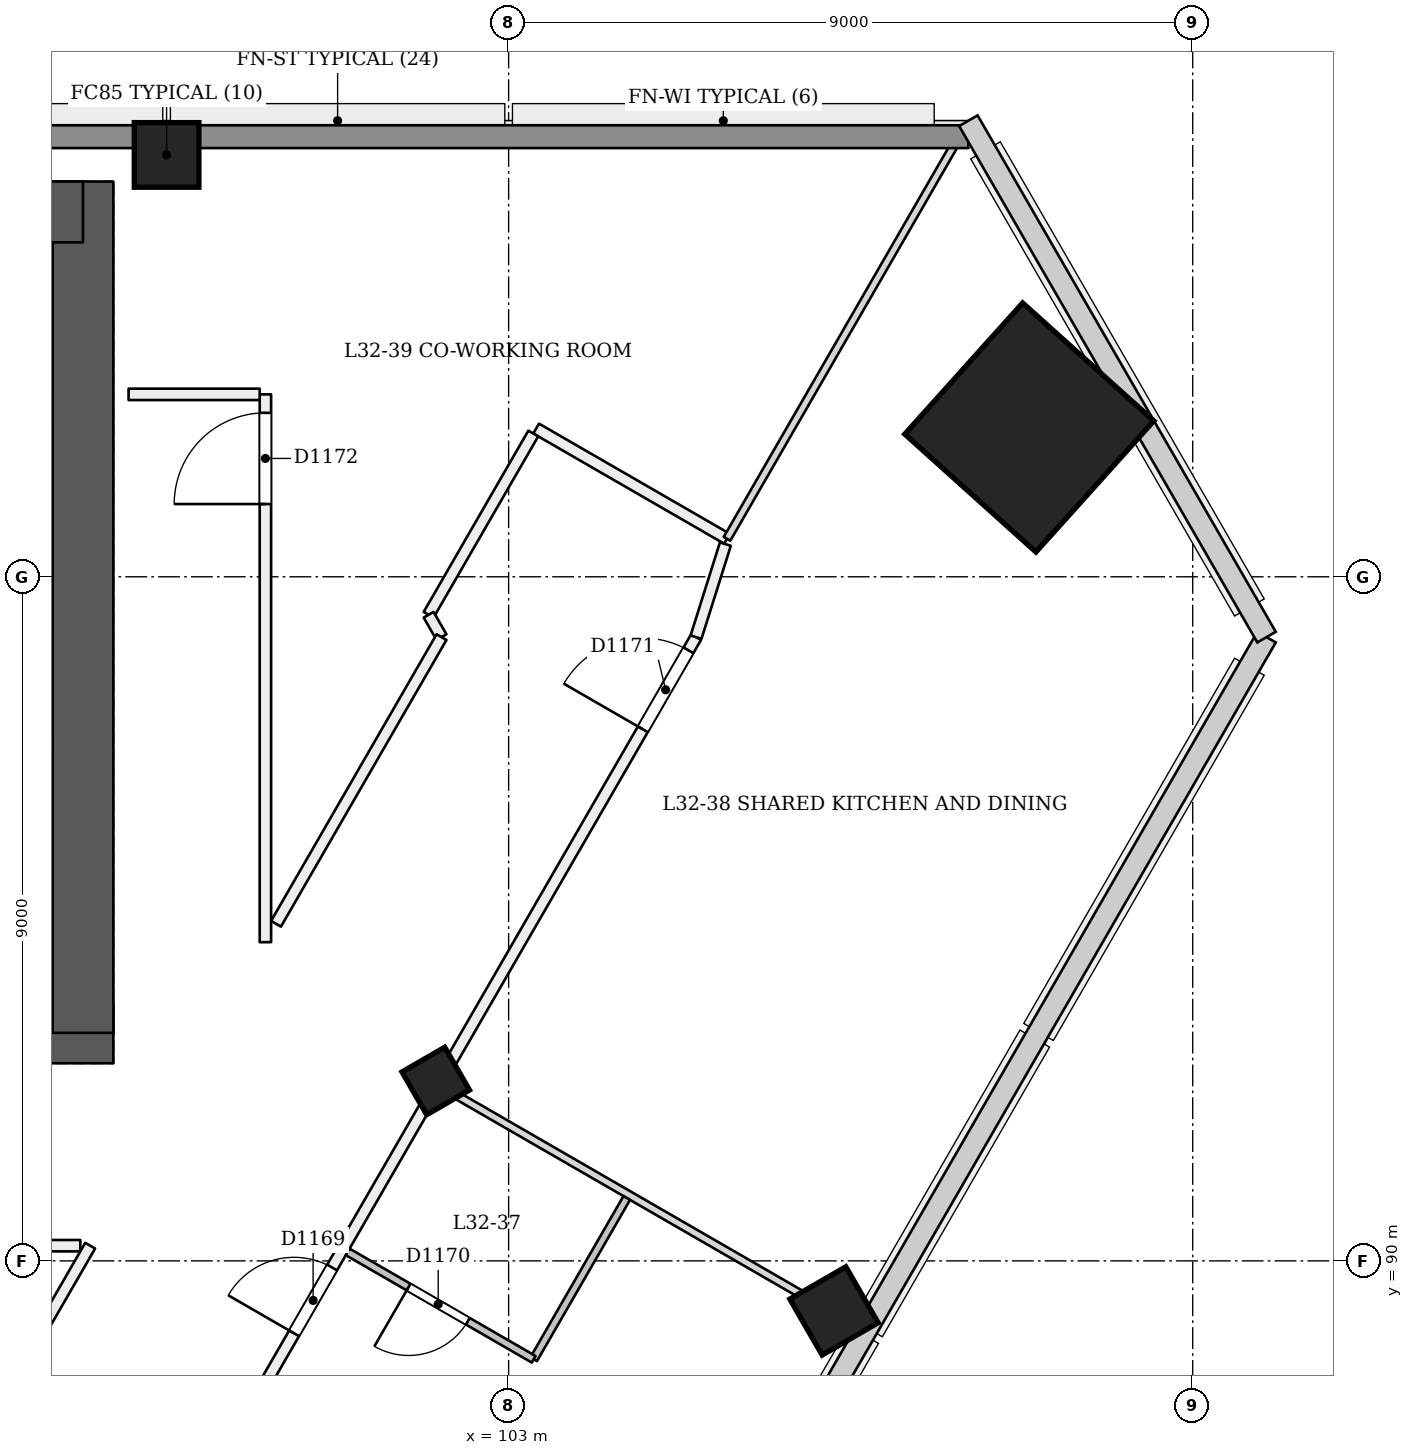
"""IFC4 building model, lengths in metres.
Left out: names, types, materials, properties, quantities, classifications, styles, units other than length and angle.
Written with IfcOpenShell. Run it as: python <this file> out.ifc"""

import sys

from ifc_helpers import new_model, si_unit, direction, frame, frame_2d, origin, origin_2d, place, context, subcontext, project, spatial, rectangle, extrude, element, fill, save


model = new_model("IFC4")
c1 = context("Model", 3, precision=1e-05, world=origin(), true_north=direction((0.0, 1.0)))
c2 = subcontext(c1, "Body", "Model", "MODEL_VIEW")
j1 = project(units=[si_unit("LENGTHUNIT", "METRE"), si_unit("PLANEANGLEUNIT", "RADIAN")], contexts=[c1])
p1 = place(None, origin())
s1 = spatial("IfcSite", under=j1, at=p1, CompositionType="ELEMENT")
p2 = place(p1, origin())
s2 = spatial("IfcBuilding", under=s1, at=p2, CompositionType="ELEMENT")
p3 = place(p2, frame((0.0, 0.0, 127.8)))
s3 = spatial("IfcBuildingStorey", under=s2, at=p3, CompositionType="ELEMENT", Elevation=127.8)
p4 = place(p3, frame((72.6, 93.0, 0.0), z_axis=(0.0, 0.0, 1.0), x_axis=(1.0, 0.0, 0.0)))
e1 = element("IfcWall", 1, at=p4, inside=s3, PredefinedType="SHEAR", context=c2, shape_type="SweptSolid", body=[
    extrude(rectangle(XDim=25.2, YDim=0.8, at=frame_2d((12.6, 0.0))), origin(), (0.0, 0.0, 1.0), 3.6),
])
p5 = place(p4, frame((1.2, 0.0, 0.0)))
e2 = element("IfcOpeningElement", 2, at=p5, cuts=e1, PredefinedType="OPENING", context=c2, shape_type="SweptSolid", body=[
    extrude(rectangle(XDim=1.2, YDim=2.1, at=frame_2d((0.6, 1.05))), frame((0.0, 0.411, 0.0), z_axis=(0.0, -1.0, 0.0), x_axis=(1.0, 0.0, 0.0)), (0.0, 0.0, 1.0), 0.821),
])
p6 = place(p4, frame((3.4, 0.0, 0.0)))
e3 = element("IfcOpeningElement", 3, at=p6, cuts=e1, PredefinedType="OPENING", context=c2, shape_type="SweptSolid", body=[
    extrude(rectangle(XDim=1.2, YDim=2.1, at=frame_2d((0.6, 1.05))), frame((0.0, 0.411, 0.0), z_axis=(0.0, -1.0, 0.0), x_axis=(1.0, 0.0, 0.0)), (0.0, 0.0, 1.0), 0.821),
])
p7 = place(p4, frame((13.4, 0.0, 0.0)))
e4 = element("IfcOpeningElement", 4, at=p7, cuts=e1, PredefinedType="OPENING", context=c2, shape_type="SweptSolid", body=[
    extrude(rectangle(XDim=1.2, YDim=2.1, at=frame_2d((0.6, 1.05))), frame((0.0, 0.411, 0.0), z_axis=(0.0, -1.0, 0.0), x_axis=(1.0, 0.0, 0.0)), (0.0, 0.0, 1.0), 0.821),
])
p8 = place(p4, frame((16.113, 0.0, 0.0)))
e5 = element("IfcOpeningElement", 5, at=p8, cuts=e1, PredefinedType="OPENING", context=c2, shape_type="SweptSolid", body=[
    extrude(rectangle(XDim=1.0, YDim=2.1, at=frame_2d((0.5, 1.05))), frame((0.0, 0.411, 0.0), z_axis=(0.0, -1.0, 0.0), x_axis=(1.0, 0.0, 0.0)), (0.0, 0.0, 1.0), 0.821),
])
p9 = place(p4, frame((20.0, 0.0, 0.0)))
e6 = element("IfcOpeningElement", 6, at=p9, cuts=e1, PredefinedType="OPENING", context=c2, shape_type="SweptSolid", body=[
    extrude(rectangle(XDim=1.0, YDim=2.1, at=frame_2d((0.5, 1.05))), frame((0.0, 0.411, 0.0), z_axis=(0.0, -1.0, 0.0), x_axis=(1.0, 0.0, 0.0)), (0.0, 0.0, 1.0), 0.821),
])
p10 = place(p4, frame((23.137, 0.0, 0.0)))
e7 = element("IfcOpeningElement", 7, at=p10, cuts=e1, PredefinedType="OPENING", context=c2, shape_type="SweptSolid", body=[
    extrude(rectangle(XDim=1.0, YDim=2.1, at=frame_2d((0.5, 1.05))), frame((0.0, 0.411, 0.0), z_axis=(0.0, -1.0, 0.0), x_axis=(1.0, 0.0, 0.0)), (0.0, 0.0, 1.0), 0.821),
])
p11 = place(p3, frame((97.4, 93.0, 0.0), z_axis=(0.0, 0.0, 1.0), x_axis=(0.0, 1.0, 0.0)))
e8 = element("IfcWall", 8, at=p11, inside=s3, PredefinedType="SHEAR", context=c2, shape_type="SweptSolid", body=[
    extrude(rectangle(XDim=11.2, YDim=0.8, at=frame_2d((5.6, 0.0))), origin(), (0.0, 0.0, 1.0), 3.6),
])
p12 = place(p3, frame((97.4, 103.8, 0.0), z_axis=(0.0, 0.0, 1.0), x_axis=(-1.0, 0.0, 0.0)))
e9 = element("IfcWall", 9, at=p12, inside=s3, PredefinedType="SHEAR", context=c2, shape_type="SweptSolid", body=[
    extrude(rectangle(XDim=25.2, YDim=0.8, at=frame_2d((12.6, 0.0))), origin(), (0.0, 0.0, 1.0), 3.6),
])
p13 = place(p3, frame((102.068, 92.32, -0.02), z_axis=(-0.02222134892, 0.038480872521, 0.999012229206), x_axis=(-0.500169954701, -0.865642171868, 0.022218161432)))
e10 = element("IfcColumn", 10, at=p13, inside=s3, PredefinedType="COLUMN", context=c2, shape_type="SweptSolid", body=[
    extrude(rectangle(XDim=0.65, YDim=0.65, at=origin_2d()), origin(), (0.0, 0.0, 1.0), 3.604),
])
p14 = place(p3, frame((109.884, 100.953, 0.0), z_axis=(-0.028403739082, 0.009219352065, 0.999554016126), x_axis=(0.500765052808, -0.865298233906, 0.022210994706)))
e11 = element("IfcColumn", 11, at=p14, inside=s3, PredefinedType="COLUMN", context=c2, shape_type="SweptSolid", body=[
    extrude(rectangle(XDim=2.32, YDim=2.32, at=origin_2d()), origin(), (0.0, 0.0, 1.0), 3.602),
])
p15 = place(p3, frame((98.5, 104.55, 0.0), z_axis=(0.0, 0.0, 1.0), x_axis=(1.0, 0.0, 0.0)))
e12 = element("IfcColumn", 12, at=p15, inside=s3, PredefinedType="COLUMN", context=c2, shape_type="SweptSolid", body=[
    extrude(rectangle(XDim=0.85, YDim=0.85, at=origin_2d()), origin(), (0.0, 0.0, 1.0), 3.6),
])
p16 = place(p3, frame((107.308, 89.295, -0.026), z_axis=(-0.02215369191, 0.038413282303, 0.999016333038), x_axis=(-0.500652774743, -0.865364202149, 0.022171981912)))
e13 = element("IfcColumn", 13, at=p16, inside=s3, PredefinedType="COLUMN", context=c2, shape_type="SweptSolid", body=[
    extrude(rectangle(XDim=0.85, YDim=0.85, at=origin_2d()), origin(), (0.0, 0.0, 1.0), 3.604),
])
p17 = place(p3, frame((88.0, 90.2, 0.0), z_axis=(0.0, 0.0, 1.0), x_axis=(1.0, 0.0, 0.0)))
e14 = element("IfcWall", 14, at=p17, inside=s3, PredefinedType="PARTITIONING", context=c2, shape_type="SweptSolid", body=[
    extrude(rectangle(XDim=9.365, YDim=0.15, at=frame_2d((4.682, 0.0))), origin(), (0.0, 0.0, 1.0), 3.15),
])
p18 = place(p17, frame((1.889, 0.0, 0.0)))
e15 = element("IfcOpeningElement", 15, at=p18, cuts=e14, PredefinedType="OPENING", context=c2, shape_type="SweptSolid", body=[
    extrude(rectangle(XDim=0.9, YDim=2.1, at=frame_2d((0.45, 1.05))), frame((0.0, 0.085, 0.0), z_axis=(0.0, -1.0, 0.0), x_axis=(1.0, 0.0, 0.0)), (0.0, 0.0, 1.0), 0.171),
])
p19 = place(p3, frame((97.495, 90.2, 0.0), z_axis=(0.0, 0.0, 1.0), x_axis=(-0.500000725976, -0.866024984641, 0.0)))
e16 = element("IfcWall", 16, at=p19, inside=s3, PredefinedType="PARTITIONING", context=c2, shape_type="SweptSolid", body=[
    extrude(rectangle(XDim=24.859, YDim=0.15, at=frame_2d((12.43, 0.0))), origin(), (0.0, 0.0, 1.0), 3.15),
])
p20 = place(p19, frame((17.98, 0.0, 0.0)))
e17 = element("IfcOpeningElement", 17, at=p20, cuts=e16, PredefinedType="OPENING", context=c2, shape_type="SweptSolid", body=[
    extrude(rectangle(XDim=1.0, YDim=2.1, at=frame_2d((0.5, 1.05))), frame((0.0, 0.085, 0.0), z_axis=(0.0, -1.0, 0.0), x_axis=(1.0, 0.0, 0.0)), (0.0, 0.0, 1.0), 0.171),
])
p21 = place(p19, frame((3.585, 0.0, 0.0)))
e18 = element("IfcOpeningElement", 18, at=p21, cuts=e16, PredefinedType="OPENING", context=c2, shape_type="SweptSolid", body=[
    extrude(rectangle(XDim=1.0, YDim=2.1, at=frame_2d((0.5, 1.05))), frame((0.0, 0.085, 0.0), z_axis=(0.0, -1.0, 0.0), x_axis=(1.0, 0.0, 0.0)), (0.0, 0.0, 1.0), 0.171),
])
p22 = place(p19, frame((12.131, 0.0, 0.0)))
e19 = element("IfcOpeningElement", 19, at=p22, cuts=e16, PredefinedType="OPENING", context=c2, shape_type="SweptSolid", body=[
    extrude(rectangle(XDim=1.0, YDim=2.1, at=frame_2d((0.5, 1.05))), frame((0.0, 0.085, 0.0), z_axis=(0.0, -1.0, 0.0), x_axis=(1.0, 0.0, 0.0)), (0.0, 0.0, 1.0), 0.171),
])
p23 = place(p19, frame((7.993, 0.0, 0.0)))
e20 = element("IfcOpeningElement", 20, at=p23, cuts=e16, PredefinedType="OPENING", context=c2, shape_type="SweptSolid", body=[
    extrude(rectangle(XDim=1.0, YDim=2.1, at=frame_2d((0.5, 1.05))), frame((0.0, 0.085, 0.0), z_axis=(0.0, -1.0, 0.0), x_axis=(1.0, 0.0, 0.0)), (0.0, 0.0, 1.0), 0.171),
])
p24 = place(p3, frame((85.17, 63.052, 0.0), z_axis=(0.0, 0.0, 1.0), x_axis=(0.499999603446, 0.866025632735, 0.0)))
e21 = element("IfcWall", 21, at=p24, inside=s3, PredefinedType="PARTITIONING", context=c2, shape_type="SweptSolid", body=[
    extrude(rectangle(XDim=40.592, YDim=0.15, at=frame_2d((20.296, 0.0))), origin(), (0.0, 0.0, 1.0), 2.75),
])
p25 = place(p24, frame((0.273, 0.0, 0.0)))
e22 = element("IfcOpeningElement", 22, at=p25, cuts=e21, PredefinedType="OPENING", context=c2, shape_type="SweptSolid", body=[
    extrude(rectangle(XDim=1.2, YDim=2.1, at=frame_2d((0.6, 1.05))), frame((0.0, 0.085, 0.0), z_axis=(0.0, -1.0, 0.0), x_axis=(1.0, 0.0, 0.0)), (0.0, 0.0, 1.0), 0.171),
])
p26 = place(p24, frame((4.046, 0.0, 0.0)))
e23 = element("IfcOpeningElement", 23, at=p26, cuts=e21, PredefinedType="OPENING", context=c2, shape_type="SweptSolid", body=[
    extrude(rectangle(XDim=1.0, YDim=2.1, at=frame_2d((0.5, 1.05))), frame((0.0, 0.085, 0.0), z_axis=(0.0, -1.0, 0.0), x_axis=(1.0, 0.0, 0.0)), (0.0, 0.0, 1.0), 0.171),
])
p27 = place(p24, frame((9.576, 0.0, 0.0)))
e24 = element("IfcOpeningElement", 24, at=p27, cuts=e21, PredefinedType="OPENING", context=c2, shape_type="SweptSolid", body=[
    extrude(rectangle(XDim=1.0, YDim=2.1, at=frame_2d((0.5, 1.05))), frame((0.0, 0.085, 0.0), z_axis=(0.0, -1.0, 0.0), x_axis=(1.0, 0.0, 0.0)), (0.0, 0.0, 1.0), 0.171),
])
p28 = place(p24, frame((11.901, 0.0, 0.0)))
e25 = element("IfcOpeningElement", 25, at=p28, cuts=e21, PredefinedType="OPENING", context=c2, shape_type="SweptSolid", body=[
    extrude(rectangle(XDim=1.0, YDim=2.1, at=frame_2d((0.5, 1.05))), frame((0.0, 0.085, 0.0), z_axis=(0.0, -1.0, 0.0), x_axis=(1.0, 0.0, 0.0)), (0.0, 0.0, 1.0), 0.171),
])
p29 = place(p24, frame((18.691, 0.0, 0.0)))
e26 = element("IfcOpeningElement", 26, at=p29, cuts=e21, PredefinedType="OPENING", context=c2, shape_type="SweptSolid", body=[
    extrude(rectangle(XDim=1.0, YDim=2.1, at=frame_2d((0.5, 1.05))), frame((0.0, 0.085, 0.0), z_axis=(0.0, -1.0, 0.0), x_axis=(1.0, 0.0, 0.0)), (0.0, 0.0, 1.0), 0.171),
])
p30 = place(p24, frame((21.016, 0.0, 0.0)))
e27 = element("IfcOpeningElement", 27, at=p30, cuts=e21, PredefinedType="OPENING", context=c2, shape_type="SweptSolid", body=[
    extrude(rectangle(XDim=1.0, YDim=2.1, at=frame_2d((0.5, 1.05))), frame((0.0, 0.085, 0.0), z_axis=(0.0, -1.0, 0.0), x_axis=(1.0, 0.0, 0.0)), (0.0, 0.0, 1.0), 0.171),
])
p31 = place(p24, frame((27.576, 0.0, 0.0)))
e28 = element("IfcOpeningElement", 28, at=p31, cuts=e21, PredefinedType="OPENING", context=c2, shape_type="SweptSolid", body=[
    extrude(rectangle(XDim=1.0, YDim=2.1, at=frame_2d((0.5, 1.05))), frame((0.0, 0.085, 0.0), z_axis=(0.0, -1.0, 0.0), x_axis=(1.0, 0.0, 0.0)), (0.0, 0.0, 1.0), 0.171),
])
p32 = place(p24, frame((30.016, 0.0, 0.0)))
e29 = element("IfcOpeningElement", 29, at=p32, cuts=e21, PredefinedType="OPENING", context=c2, shape_type="SweptSolid", body=[
    extrude(rectangle(XDim=1.0, YDim=2.1, at=frame_2d((0.5, 1.05))), frame((0.0, 0.085, 0.0), z_axis=(0.0, -1.0, 0.0), x_axis=(1.0, 0.0, 0.0)), (0.0, 0.0, 1.0), 0.171),
])
p33 = place(p24, frame((39.192, 0.0, 0.0)))
e30 = element("IfcOpeningElement", 30, at=p33, cuts=e21, PredefinedType="OPENING", context=c2, shape_type="SweptSolid", body=[
    extrude(rectangle(XDim=1.2, YDim=2.1, at=frame_2d((0.6, 1.05))), frame((0.0, 0.085, 0.0), z_axis=(0.0, -1.0, 0.0), x_axis=(1.0, 0.0, 0.0)), (0.0, 0.0, 1.0), 0.171),
])
p34 = place(p3, frame((105.466, 98.206, 0.0), z_axis=(0.0, 0.0, 1.0), x_axis=(0.300548671062, 0.953766478926, 0.0)))
e31 = element("IfcWall", 31, at=p34, inside=s3, PredefinedType="PARTITIONING", context=c2, shape_type="SweptSolid", body=[
    extrude(rectangle(XDim=1.283, YDim=0.15, at=frame_2d((0.642, 0.0))), origin(), (0.0, 0.0, 1.0), 3.15),
])
p35 = place(p3, frame((105.873, 99.5, 0.0), z_axis=(0.0, 0.0, 1.0), x_axis=(-0.866032775405, 0.499987231761, 0.0)))
e32 = element("IfcWall", 32, at=p35, inside=s3, PredefinedType="PARTITIONING", context=c2, shape_type="SweptSolid", body=[
    extrude(rectangle(XDim=2.9, YDim=0.15, at=frame_2d((1.45, 0.0))), origin(), (0.0, 0.0, 1.0), 3.15),
])
p36 = place(p3, frame((103.324, 100.885, 0.0), z_axis=(0.0, 0.0, 1.0), x_axis=(-0.499991038717, -0.866030577522, 0.0)))
e33 = element("IfcWall", 33, at=p36, inside=s3, PredefinedType="PARTITIONING", context=c2, shape_type="SweptSolid", body=[
    extrude(rectangle(XDim=2.754, YDim=0.15, at=frame_2d((1.377, 0.0))), origin(), (0.0, 0.0, 1.0), 3.15),
])
p37 = place(p3, frame((101.948, 98.5, 0.0), z_axis=(0.0, 0.0, 1.0), x_axis=(0.499390178911, -0.866377197996, 0.0)))
e34 = element("IfcWall", 34, at=p37, inside=s3, PredefinedType="PARTITIONING", context=c2, shape_type="SweptSolid", body=[
    extrude(rectangle(XDim=0.339, YDim=0.15, at=frame_2d((0.17, 0.0))), origin(), (0.0, 0.0, 1.0), 3.15),
])
p38 = place(p3, frame((102.117, 98.206, 0.0), z_axis=(0.0, 0.0, 1.0), x_axis=(-0.499992644437, -0.866029650479, 0.0)))
e35 = element("IfcWall", 35, at=p38, inside=s3, PredefinedType="PARTITIONING", context=c2, shape_type="SweptSolid", body=[
    extrude(rectangle(XDim=4.354, YDim=0.15, at=frame_2d((2.177, 0.0))), origin(), (0.0, 0.0, 1.0), 3.15),
])
p39 = place(p3, frame((99.8, 94.193, 0.0), z_axis=(0.0, 0.0, 1.0), x_axis=(0.0, 1.0, 0.0)))
e36 = element("IfcWall", 36, at=p39, inside=s3, PredefinedType="PARTITIONING", context=c2, shape_type="SweptSolid", body=[
    extrude(rectangle(XDim=7.207, YDim=0.15, at=frame_2d((3.604, 0.0))), origin(), (0.0, 0.0, 1.0), 3.15),
])
p40 = place(p39, frame((5.764, 0.0, 0.0)))
e37 = element("IfcOpeningElement", 37, at=p40, cuts=e36, PredefinedType="OPENING", context=c2, shape_type="SweptSolid", body=[
    extrude(rectangle(XDim=1.2, YDim=2.1, at=frame_2d((0.6, 1.05))), frame((0.0, 0.085, 0.0), z_axis=(0.0, -1.0, 0.0), x_axis=(1.0, 0.0, 0.0)), (0.0, 0.0, 1.0), 0.171),
])
p41 = place(p3, frame((99.725, 101.4, 0.0), z_axis=(0.0, 0.0, 1.0), x_axis=(-1.0, 0.0, 0.0)))
e38 = element("IfcWall", 38, at=p41, inside=s3, PredefinedType="PARTITIONING", context=c2, shape_type="SweptSolid", body=[
    extrude(rectangle(XDim=1.725, YDim=0.15, at=frame_2d((0.863, 0.0))), origin(), (0.0, 0.0, 1.0), 3.15),
])
p42 = place(p3, frame((104.554, 90.827, 0.0), z_axis=(0.0, 0.0, 1.0), x_axis=(-0.500018594424, -0.866014668023, 0.0)))
e39 = element("IfcWall", 39, at=p42, inside=s3, PredefinedType="PARTITIONING", context=c2, shape_type="SweptSolid", body=[
    extrude(rectangle(XDim=2.45, YDim=0.1, at=frame_2d((1.225, 0.0))), origin(), (0.0, 0.0, 1.0), 2.75),
])
p43 = place(p3, frame((103.329, 88.706, 0.0), z_axis=(0.0, 0.0, 1.0), x_axis=(-0.866011447264, 0.500024172624, 0.0)))
e40 = element("IfcWall", 40, at=p43, inside=s3, PredefinedType="PARTITIONING", context=c2, shape_type="SweptSolid", body=[
    extrude(rectangle(XDim=2.825, YDim=0.1, at=frame_2d((1.413, 0.0))), origin(), (0.0, 0.0, 1.0), 3.15),
])
p44 = place(p43, frame((1.0, 0.0, 0.0)))
e41 = element("IfcOpeningElement", 41, at=p44, cuts=e40, PredefinedType="OPENING", context=c2, shape_type="SweptSolid", body=[
    extrude(rectangle(XDim=0.9, YDim=2.1, at=frame_2d((0.45, 1.05))), frame((0.0, 0.061, 0.0), z_axis=(0.0, -1.0, 0.0), x_axis=(1.0, 0.0, 0.0)), (0.0, 0.0, 1.0), 0.121),
])
p45 = place(p3, frame((107.61, 89.121, 0.0), z_axis=(0.0, 0.0, 1.0), x_axis=(-0.866015887322, 0.500016482634, 0.0)))
e42 = element("IfcWall", 42, at=p45, inside=s3, PredefinedType="PARTITIONING", context=c2, shape_type="SweptSolid", body=[
    extrude(rectangle(XDim=6.325, YDim=0.1, at=frame_2d((3.163, 0.0))), origin(), (0.0, 0.0, 1.0), 2.65),
])
p46 = place(p3, frame((108.991, 104.9, 0.0), z_axis=(0.0, 0.0, 1.0), x_axis=(-0.500004896655, -0.866022576681, 0.0)))
e43 = element("IfcWall", 43, at=p46, inside=s3, PredefinedType="PARTITIONING", context=c2, shape_type="SweptSolid", body=[
    extrude(rectangle(XDim=6.235, YDim=0.1, at=frame_2d((3.118, 0.0))), origin(), (0.0, 0.0, 1.0), 2.65),
])
p47 = place(p3, frame((60.951, 104.79, 0.0), z_axis=(0.0, 0.0, 1.0), x_axis=(1.0, 0.0, 0.0)))
e44 = element("IfcWall", 44, at=p47, inside=s3, PredefinedType="SOLIDWALL", context=c2, shape_type="SweptSolid", body=[
    extrude(rectangle(XDim=48.098, YDim=0.3, at=frame_2d((24.049, 0.0))), origin(), (0.0, 0.0, 1.0), 2.65),
])
p48 = place(p32, origin())
e45 = element("IfcDoor", 45, at=p48, inside=s3, OperationType="SINGLE_SWING_LEFT", PredefinedType="NOTDEFINED", context=c2, shape_type="SweptSolid", body=[
    extrude(rectangle(XDim=1.0, YDim=2.1, at=frame_2d((0.5, 1.05))), frame((0.0, 0.025, 0.0), z_axis=(0.0, -1.0, 0.0), x_axis=(1.0, 0.0, 0.0)), (0.0, 0.0, 1.0), 0.05),
])
fill(e29, e45)
p49 = place(p44, origin())
e46 = element("IfcDoor", 46, at=p49, inside=s3, OperationType="SINGLE_SWING_RIGHT", PredefinedType="NOTDEFINED", context=c2, shape_type="SweptSolid", body=[
    extrude(rectangle(XDim=0.9, YDim=2.1, at=frame_2d((0.45, 1.05))), frame((0.0, 0.025, 0.0), z_axis=(0.0, -1.0, 0.0), x_axis=(1.0, 0.0, 0.0)), (0.0, 0.0, 1.0), 0.05),
])
fill(e41, e46)
p50 = place(p33, origin())
e47 = element("IfcDoor", 47, at=p50, inside=s3, OperationType="SINGLE_SWING_LEFT", PredefinedType="NOTDEFINED", context=c2, shape_type="SweptSolid", body=[
    extrude(rectangle(XDim=1.2, YDim=2.1, at=frame_2d((0.6, 1.05))), frame((0.0, 0.025, 0.0), z_axis=(0.0, -1.0, 0.0), x_axis=(1.0, 0.0, 0.0)), (0.0, 0.0, 1.0), 0.05),
])
fill(e30, e47)
p51 = place(p40, origin())
e48 = element("IfcDoor", 48, at=p51, inside=s3, OperationType="SINGLE_SWING_LEFT", PredefinedType="NOTDEFINED", context=c2, shape_type="SweptSolid", body=[
    extrude(rectangle(XDim=1.2, YDim=2.1, at=frame_2d((0.6, 1.05))), frame((0.0, 0.025, 0.0), z_axis=(0.0, -1.0, 0.0), x_axis=(1.0, 0.0, 0.0)), (0.0, 0.0, 1.0), 0.05),
])
fill(e37, e48)
save(model, sys.argv[1])
